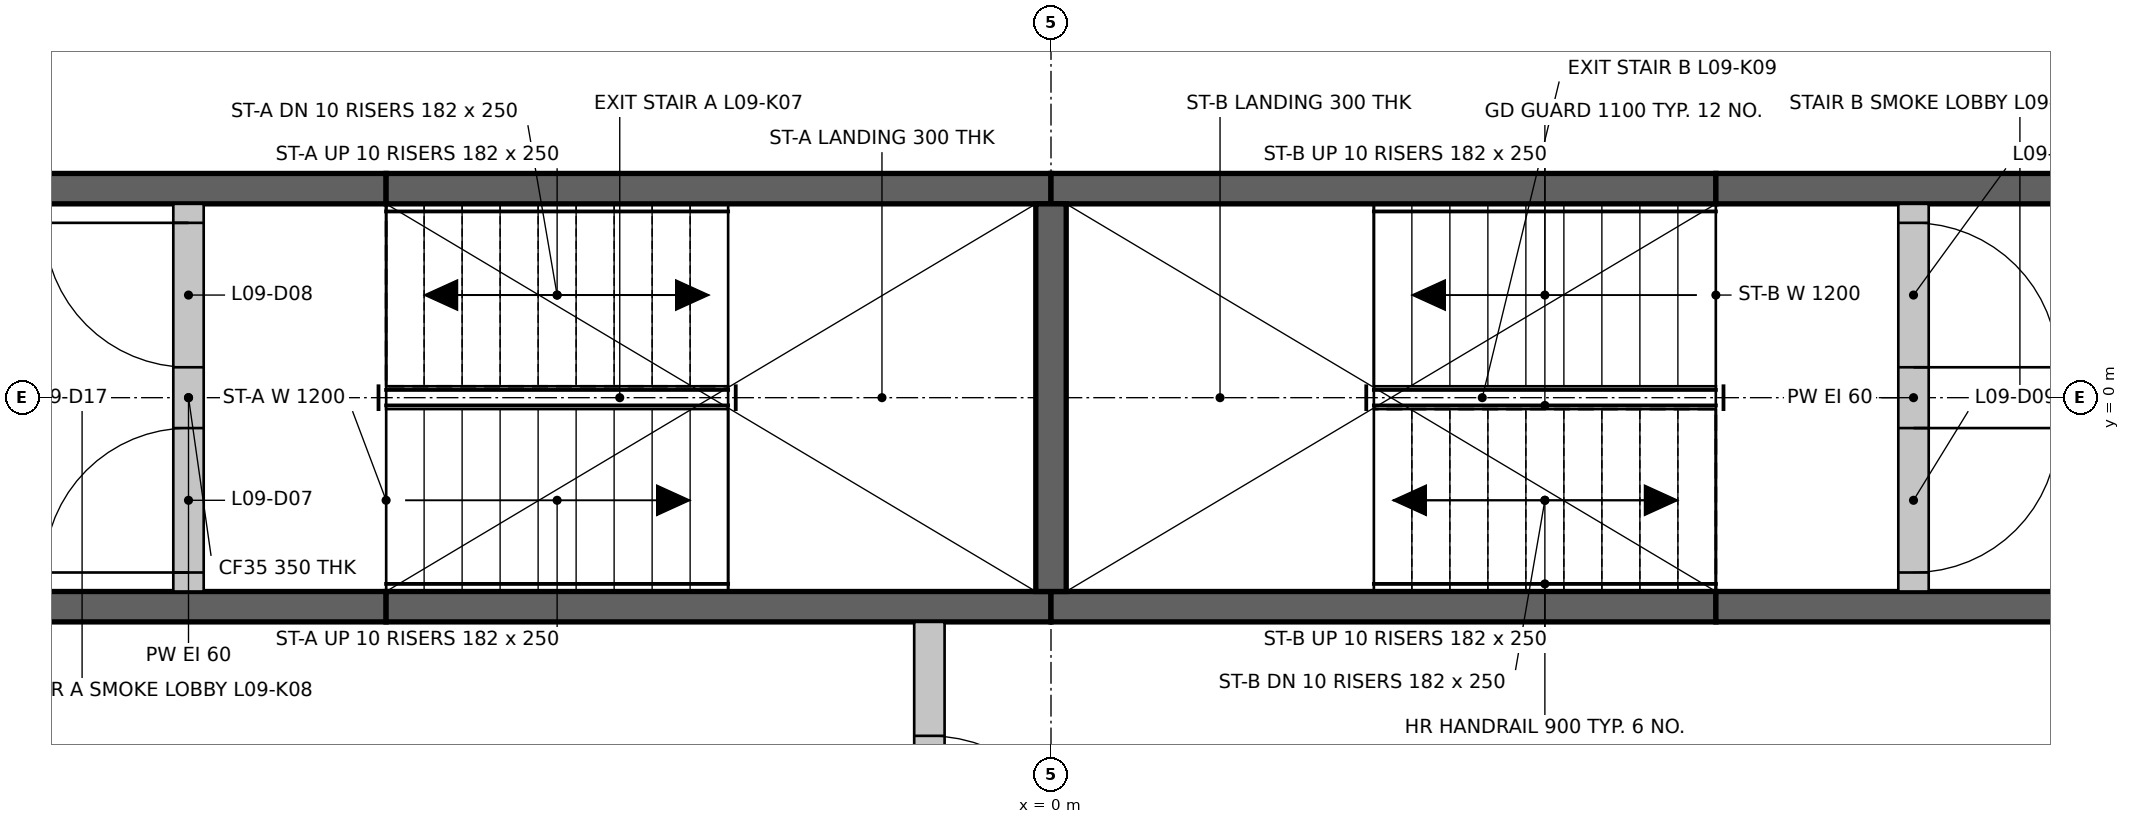
"""IFC4 building model, lengths in metres.
Left out: names, types, materials, properties, quantities, classifications, styles, units other than length and angle.
Written with IfcOpenShell. Run it as: python <this file> out.ifc"""

import sys

from ifc_helpers import new_model, si_unit, direction, frame, frame_2d, origin, place, context, subcontext, project, spatial, rectangle, extrude, element, fill, save


model = new_model("IFC4")
c1 = context("Model", 3, precision=1e-05, world=origin(), true_north=direction((0.0, 1.0)))
c2 = subcontext(c1, "Body", "Model", "MODEL_VIEW")
j1 = project(units=[si_unit("LENGTHUNIT", "METRE"), si_unit("PLANEANGLEUNIT", "RADIAN")], contexts=[c1])
p1 = place(None, origin())
s1 = spatial("IfcSite", under=j1, at=p1, CompositionType="ELEMENT")
p2 = place(p1, origin())
s2 = spatial("IfcBuilding", under=s1, at=p2, CompositionType="ELEMENT")
p3 = place(p2, frame((0.0, 0.0, 44.45)))
s3 = spatial("IfcBuildingStorey", under=s2, at=p3, CompositionType="ELEMENT", Elevation=44.45)
p4 = place(p3, frame((-6.974, -1.375, 0.0), z_axis=(0.0, 0.0, 1.0), x_axis=(1.0, 0.0, 0.0)))
e1 = element("IfcWall", 1, at=p4, inside=s3, PredefinedType="SHEAR", context=c2, shape_type="SweptSolid", body=[
    extrude(rectangle(XDim=2.6, YDim=0.2, at=frame_2d((1.3, 0.0))), origin(), (0.0, 0.0, 1.0), 3.3),
])
for number, where, z_axis, x_axis in (
    (2, (-4.374, -1.375, 0.0), (0.0, 0.0, 1.0), (1.0, 0.0, 0.0)),
    (3, (0.0, -1.375, 0.0), (0.0, 0.0, 1.0), (1.0, 0.0, 0.0)),
):
    element("IfcWall", number, at=place(p3, frame(where, z_axis=z_axis, x_axis=x_axis)), inside=s3, PredefinedType="SHEAR", context=c2, shape_type="SweptSolid", body=[
        extrude(rectangle(XDim=4.374, YDim=0.2, at=frame_2d((2.187, 0.0))), origin(), (0.0, 0.0, 1.0), 3.3),
    ])
for number, where, z_axis, x_axis in (
    (4, (4.374, -1.375, 0.0), (0.0, 0.0, 1.0), (1.0, 0.0, 0.0)),
    (5, (-6.974, 1.375, 0.0), (0.0, 0.0, 1.0), (1.0, 0.0, 0.0)),
):
    element("IfcWall", number, at=place(p3, frame(where, z_axis=z_axis, x_axis=x_axis)), inside=s3, PredefinedType="SHEAR", context=c2, shape_type="SweptSolid", body=[
        extrude(rectangle(XDim=2.6, YDim=0.2, at=frame_2d((1.3, 0.0))), origin(), (0.0, 0.0, 1.0), 3.3),
    ])
for number, where, z_axis, x_axis in (
    (6, (-4.374, 1.375, 0.0), (0.0, 0.0, 1.0), (1.0, 0.0, 0.0)),
    (7, (0.0, 1.375, 0.0), (0.0, 0.0, 1.0), (1.0, 0.0, 0.0)),
):
    element("IfcWall", number, at=place(p3, frame(where, z_axis=z_axis, x_axis=x_axis)), inside=s3, PredefinedType="SHEAR", context=c2, shape_type="SweptSolid", body=[
        extrude(rectangle(XDim=4.374, YDim=0.2, at=frame_2d((2.187, 0.0))), origin(), (0.0, 0.0, 1.0), 3.3),
    ])
p5 = place(p3, frame((4.374, 1.375, 0.0), z_axis=(0.0, 0.0, 1.0), x_axis=(1.0, 0.0, 0.0)))
e8 = element("IfcWall", 8, at=p5, inside=s3, PredefinedType="SHEAR", context=c2, shape_type="SweptSolid", body=[
    extrude(rectangle(XDim=2.6, YDim=0.2, at=frame_2d((1.3, 0.0))), origin(), (0.0, 0.0, 1.0), 3.3),
])
p6 = place(p3, frame((0.0, -1.275, 0.0), z_axis=(0.0, 0.0, 1.0), x_axis=(0.0, 1.0, 0.0)))
e9 = element("IfcWall", 9, at=p6, inside=s3, PredefinedType="SHEAR", context=c2, shape_type="SweptSolid", body=[
    extrude(rectangle(XDim=2.55, YDim=0.2, at=frame_2d((1.275, 0.0))), origin(), (0.0, 0.0, 1.0), 3.3),
])
p7 = place(p3, frame((-0.8, -3.974, 0.0), z_axis=(0.0, 0.0, 1.0), x_axis=(0.0, 1.0, 0.0)))
e10 = element("IfcWall", 10, at=p7, inside=s3, PredefinedType="PARTITIONING", context=c2, shape_type="SweptSolid", body=[
    extrude(rectangle(XDim=2.499, YDim=0.2, at=frame_2d((1.25, 0.0))), origin(), (0.0, 0.0, 1.0), 3.3),
])
p8 = place(p7, frame((0.75, 0.0, 0.0)))
e11 = element("IfcOpeningElement", 11, at=p8, cuts=e10, PredefinedType="OPENING", context=c2, shape_type="SweptSolid", body=[
    extrude(rectangle(XDim=1.0, YDim=2.1, at=frame_2d((0.5, 1.05))), frame((0.0, 0.11, 0.0), z_axis=(0.0, -1.0, 0.0), x_axis=(1.0, 0.0, 0.0)), (0.0, 0.0, 1.0), 0.22),
])
p9 = place(p3, frame((-5.674, -1.275, 0.0), z_axis=(0.0, 0.0, 1.0), x_axis=(0.0, 1.0, 0.0)))
e12 = element("IfcWall", 12, at=p9, inside=s3, PredefinedType="PARTITIONING", context=c2, shape_type="SweptSolid", body=[
    extrude(rectangle(XDim=2.55, YDim=0.2, at=frame_2d((1.275, 0.0))), origin(), (0.0, 0.0, 1.0), 3.3),
])
p10 = place(p9, frame((0.125, 0.0, 0.0)))
e13 = element("IfcOpeningElement", 13, at=p10, cuts=e12, PredefinedType="OPENING", context=c2, shape_type="SweptSolid", body=[
    extrude(rectangle(XDim=0.95, YDim=2.1, at=frame_2d((0.475, 1.05))), frame((0.0, 0.11, 0.0), z_axis=(0.0, -1.0, 0.0), x_axis=(1.0, 0.0, 0.0)), (0.0, 0.0, 1.0), 0.22),
])
p11 = place(p9, frame((1.475, 0.0, 0.0)))
e14 = element("IfcOpeningElement", 14, at=p11, cuts=e12, PredefinedType="OPENING", context=c2, shape_type="SweptSolid", body=[
    extrude(rectangle(XDim=0.95, YDim=2.1, at=frame_2d((0.475, 1.05))), frame((0.0, 0.11, 0.0), z_axis=(0.0, -1.0, 0.0), x_axis=(1.0, 0.0, 0.0)), (0.0, 0.0, 1.0), 0.22),
])
p12 = place(p3, frame((5.674, -1.275, 0.0), z_axis=(0.0, 0.0, 1.0), x_axis=(0.0, 1.0, 0.0)))
e15 = element("IfcWall", 15, at=p12, inside=s3, PredefinedType="PARTITIONING", context=c2, shape_type="SweptSolid", body=[
    extrude(rectangle(XDim=2.55, YDim=0.2, at=frame_2d((1.275, 0.0))), origin(), (0.0, 0.0, 1.0), 3.3),
])
p13 = place(p12, frame((0.125, 0.0, 0.0)))
e16 = element("IfcOpeningElement", 16, at=p13, cuts=e15, PredefinedType="OPENING", context=c2, shape_type="SweptSolid", body=[
    extrude(rectangle(XDim=0.95, YDim=2.1, at=frame_2d((0.475, 1.05))), frame((0.0, 0.11, 0.0), z_axis=(0.0, -1.0, 0.0), x_axis=(1.0, 0.0, 0.0)), (0.0, 0.0, 1.0), 0.22),
])
p14 = place(p12, frame((1.475, 0.0, 0.0)))
e17 = element("IfcOpeningElement", 17, at=p14, cuts=e15, PredefinedType="OPENING", context=c2, shape_type="SweptSolid", body=[
    extrude(rectangle(XDim=0.95, YDim=2.1, at=frame_2d((0.475, 1.05))), frame((0.0, 0.11, 0.0), z_axis=(0.0, -1.0, 0.0), x_axis=(1.0, 0.0, 0.0)), (0.0, 0.0, 1.0), 0.22),
])
p15 = place(p10, origin())
e18 = element("IfcDoor", 18, at=p15, inside=s3, OperationType="SINGLE_SWING_LEFT", PredefinedType="DOOR", context=c2, shape_type="SweptSolid", body=[
    extrude(rectangle(XDim=0.95, YDim=2.1, at=frame_2d((0.475, 1.05))), frame((0.0, 0.025, 0.0), z_axis=(0.0, -1.0, 0.0), x_axis=(1.0, 0.0, 0.0)), (0.0, 0.0, 1.0), 0.05),
])
fill(e13, e18)
p16 = place(p11, origin())
e19 = element("IfcDoor", 19, at=p16, inside=s3, OperationType="SINGLE_SWING_RIGHT", PredefinedType="DOOR", context=c2, shape_type="SweptSolid", body=[
    extrude(rectangle(XDim=0.95, YDim=2.1, at=frame_2d((0.475, 1.05))), frame((0.0, 0.025, 0.0), z_axis=(0.0, -1.0, 0.0), x_axis=(1.0, 0.0, 0.0)), (0.0, 0.0, 1.0), 0.05),
])
fill(e14, e19)
p17 = place(p13, frame((0.95, 0.0, 0.0), z_axis=(0.0, 0.0, 1.0), x_axis=(-1.0, 0.0, 0.0)))
e20 = element("IfcDoor", 20, at=p17, inside=s3, OperationType="SINGLE_SWING_RIGHT", PredefinedType="DOOR", context=c2, shape_type="SweptSolid", body=[
    extrude(rectangle(XDim=0.95, YDim=2.1, at=frame_2d((0.475, 1.05))), frame((0.0, 0.025, 0.0), z_axis=(0.0, -1.0, 0.0), x_axis=(1.0, 0.0, 0.0)), (0.0, 0.0, 1.0), 0.05),
])
fill(e16, e20)
p18 = place(p14, frame((0.95, 0.0, 0.0), z_axis=(0.0, 0.0, 1.0), x_axis=(-1.0, 0.0, 0.0)))
e21 = element("IfcDoor", 21, at=p18, inside=s3, OperationType="SINGLE_SWING_LEFT", PredefinedType="DOOR", context=c2, shape_type="SweptSolid", body=[
    extrude(rectangle(XDim=0.95, YDim=2.1, at=frame_2d((0.475, 1.05))), frame((0.0, 0.025, 0.0), z_axis=(0.0, -1.0, 0.0), x_axis=(1.0, 0.0, 0.0)), (0.0, 0.0, 1.0), 0.05),
])
fill(e17, e21)
p19 = place(p8, frame((1.0, 0.0, 0.0), z_axis=(0.0, 0.0, 1.0), x_axis=(-1.0, 0.0, 0.0)))
e22 = element("IfcDoor", 22, at=p19, inside=s3, OperationType="SINGLE_SWING_LEFT", PredefinedType="DOOR", context=c2, shape_type="SweptSolid", body=[
    extrude(rectangle(XDim=1.0, YDim=2.1, at=frame_2d((0.5, 1.05))), frame((0.0, 0.025, 0.0), z_axis=(0.0, -1.0, 0.0), x_axis=(1.0, 0.0, 0.0)), (0.0, 0.0, 1.0), 0.05),
])
fill(e11, e22)
save(model, sys.argv[1])
